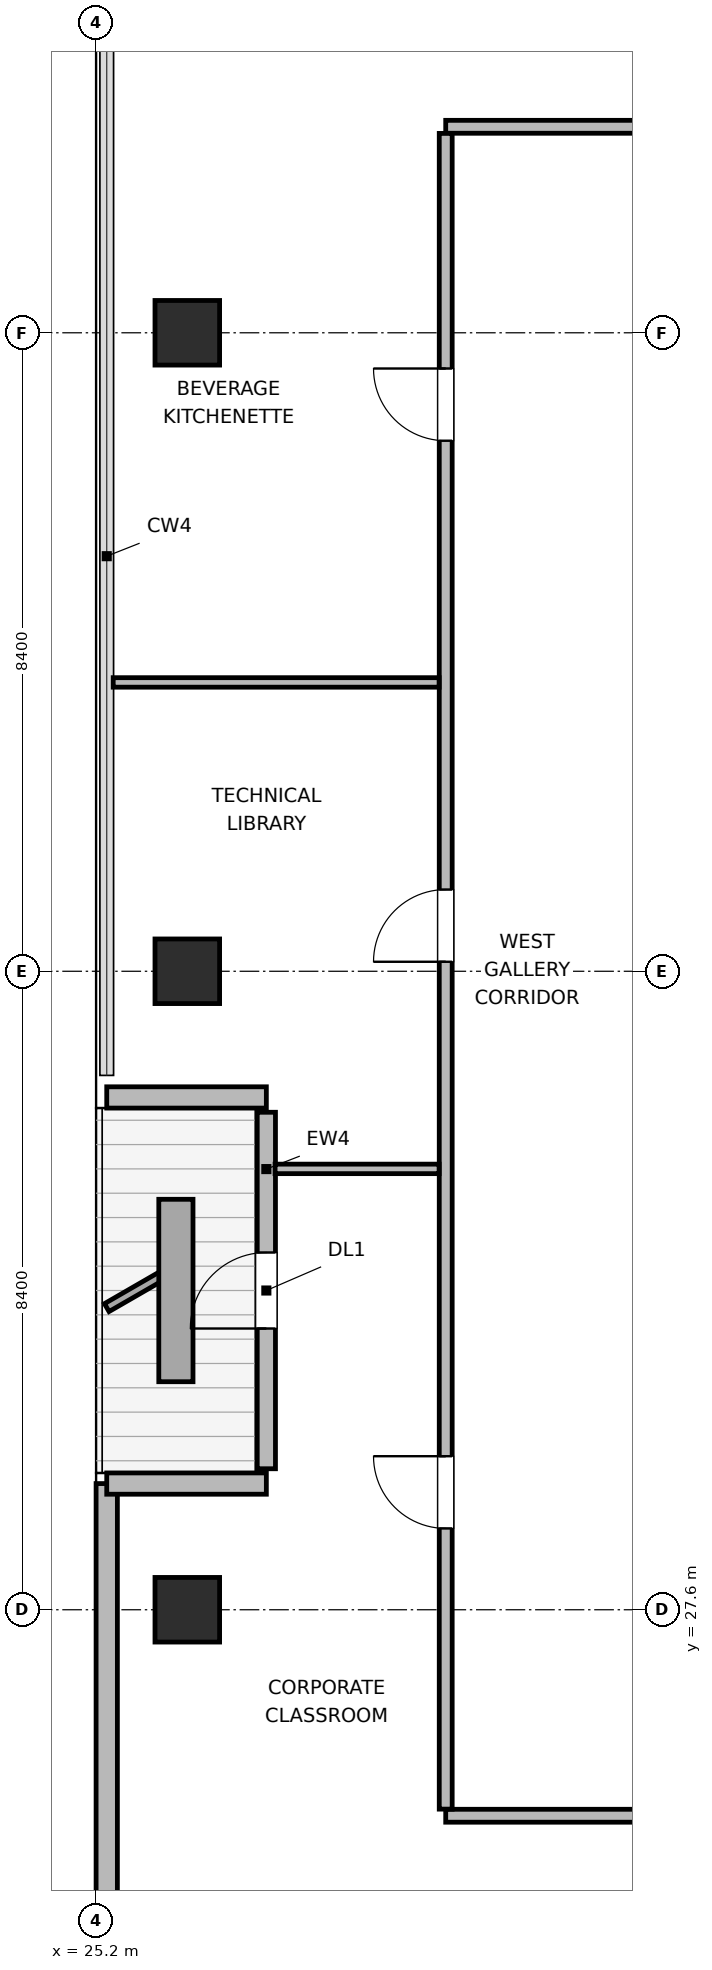
"""IFC4 building model, lengths in metres.
Left out: names, types, materials, properties, quantities, classifications, styles, units other than length and angle.
Written with IfcOpenShell. Run it as: python <this file> out.ifc"""

import sys

from ifc_helpers import new_model, si_unit, direction, frame, frame_2d, origin, origin_2d, place, context, subcontext, project, spatial, rectangle, extrude, element, fill, save


model = new_model("IFC4")
c1 = context("Model", 3, precision=1e-05, world=origin(), true_north=direction((0.0, 1.0)))
c2 = subcontext(c1, "Body", "Model", "MODEL_VIEW")
j1 = project(units=[si_unit("LENGTHUNIT", "METRE"), si_unit("PLANEANGLEUNIT", "RADIAN")], contexts=[c1])
p1 = place(None, origin())
s1 = spatial("IfcSite", under=j1, at=p1, CompositionType="ELEMENT")
p2 = place(p1, origin())
s2 = spatial("IfcBuilding", under=s1, at=p2, CompositionType="ELEMENT")
p3 = place(p2, frame((0.0, 0.0, 342.0)))
s3 = spatial("IfcBuildingStorey", under=s2, at=p3, CompositionType="ELEMENT", Elevation=342.0)
for number, where, z_axis, x_axis in (
    (1, (26.4, 27.6, 0.0), (0.0, 0.0, 1.0), (1.0, 0.0, 0.0)),
    (2, (26.4, 36.0, 0.0), (0.0, 0.0, 1.0), (1.0, 0.0, 0.0)),
    (3, (26.4, 44.4, 0.0), (0.0, 0.0, 1.0), (1.0, 0.0, 0.0)),
):
    element("IfcColumn", number, at=place(p3, frame(where, z_axis=z_axis, x_axis=x_axis)), inside=s3, PredefinedType="COLUMN", context=c2, shape_type="SweptSolid", body=[
        extrude(rectangle(XDim=0.85, YDim=0.85, at=origin_2d()), origin(), (0.0, 0.0, 1.0), 4.5),
    ])
p4 = place(p3, frame((25.34, 23.418, 0.0), z_axis=(0.0, 0.0, 1.0), x_axis=(0.0, 1.0, 0.0)))
e4 = element("IfcWall", 4, at=p4, inside=s3, PredefinedType="SOLIDWALL", context=c2, shape_type="SweptSolid", body=[
    extrude(rectangle(XDim=5.842, YDim=0.28, at=frame_2d((2.921, 0.0))), origin(), (0.0, 0.0, 1.0), 4.28),
])
p5 = place(p3, frame((25.34, 29.26, 0.0), z_axis=(0.0, 0.0, 1.0), x_axis=(1.0, 0.0, 0.0)))
e5 = element("IfcWall", 5, at=p5, inside=s3, PredefinedType="SOLIDWALL", context=c2, shape_type="SweptSolid", body=[
    extrude(rectangle(XDim=2.1, YDim=0.28, at=frame_2d((1.05, 0.0))), origin(), (0.0, 0.0, 1.0), 3.726),
])
p6 = place(p3, frame((27.44, 29.455, 0.0), z_axis=(0.0, 0.0, 1.0), x_axis=(0.0, 1.0, 0.0)))
e6 = element("IfcWall", 6, at=p6, inside=s3, PredefinedType="SOLIDWALL", context=c2, shape_type="SweptSolid", body=[
    extrude(rectangle(XDim=4.69, YDim=0.24, at=frame_2d((2.345, 0.0))), origin(), (0.0, 0.0, 1.0), 3.911),
])
p7 = place(p6, frame((1.845, 0.0, 0.0)))
e7 = element("IfcOpeningElement", 7, at=p7, cuts=e6, PredefinedType="OPENING", context=c2, shape_type="SweptSolid", body=[
    extrude(rectangle(XDim=1.0, YDim=2.02, at=frame_2d((0.5, 1.01))), frame((0.0, 0.13, 0.0), z_axis=(0.0, -1.0, 0.0), x_axis=(1.0, 0.0, 0.0)), (0.0, 0.0, 1.0), 0.26),
])
p8 = place(p3, frame((27.44, 34.34, 0.0), z_axis=(0.0, 0.0, 1.0), x_axis=(-1.0, 0.0, 0.0)))
e8 = element("IfcWall", 8, at=p8, inside=s3, PredefinedType="SOLIDWALL", context=c2, shape_type="SweptSolid", body=[
    extrude(rectangle(XDim=2.1, YDim=0.28, at=frame_2d((1.05, 0.0))), origin(), (0.0, 0.0, 1.0), 3.726),
])
p9 = place(p3, frame((29.8, 24.89, 0.0), z_axis=(0.0, 0.0, 1.0), x_axis=(1.0, 0.0, 0.0)))
e9 = element("IfcWall", 9, at=p9, inside=s3, PredefinedType="PARTITIONING", context=c2, shape_type="SweptSolid", body=[
    extrude(rectangle(XDim=33.8, YDim=0.17, at=frame_2d((16.9, 0.0))), origin(), (0.0, 0.0, 1.0), 4.28),
])
p10 = place(p9, frame((7.975, 0.0, 0.0)))
e10 = element("IfcOpeningElement", 10, at=p10, cuts=e9, PredefinedType="OPENING", context=c2, shape_type="SweptSolid", body=[
    extrude(rectangle(XDim=0.95, YDim=2.04, at=frame_2d((0.475, 1.02))), frame((0.0, 0.095, 0.0), z_axis=(0.0, -1.0, 0.0), x_axis=(1.0, 0.0, 0.0)), (0.0, 0.0, 1.0), 0.19),
])
p11 = place(p9, frame((24.875, 0.0, 0.0)))
e11 = element("IfcOpeningElement", 11, at=p11, cuts=e9, PredefinedType="OPENING", context=c2, shape_type="SweptSolid", body=[
    extrude(rectangle(XDim=0.95, YDim=2.04, at=frame_2d((0.475, 1.02))), frame((0.0, 0.095, 0.0), z_axis=(0.0, -1.0, 0.0), x_axis=(1.0, 0.0, 0.0)), (0.0, 0.0, 1.0), 0.19),
])
p12 = place(p3, frame((29.8, 47.11, 0.0), z_axis=(0.0, 0.0, 1.0), x_axis=(1.0, 0.0, 0.0)))
e12 = element("IfcWall", 12, at=p12, inside=s3, PredefinedType="PARTITIONING", context=c2, shape_type="SweptSolid", body=[
    extrude(rectangle(XDim=33.8, YDim=0.17, at=frame_2d((16.9, 0.0))), origin(), (0.0, 0.0, 1.0), 4.28),
])
p13 = place(p12, frame((5.89, 0.0, 0.0)))
e13 = element("IfcOpeningElement", 13, at=p13, cuts=e12, PredefinedType="OPENING", context=c2, shape_type="SweptSolid", body=[
    extrude(rectangle(XDim=0.95, YDim=2.04, at=frame_2d((0.475, 1.02))), frame((0.0, 0.095, 0.0), z_axis=(0.0, -1.0, 0.0), x_axis=(1.0, 0.0, 0.0)), (0.0, 0.0, 1.0), 0.19),
])
p14 = place(p12, frame((19.31, 0.0, 0.0)))
e14 = element("IfcOpeningElement", 14, at=p14, cuts=e12, PredefinedType="OPENING", context=c2, shape_type="SweptSolid", body=[
    extrude(rectangle(XDim=0.95, YDim=2.04, at=frame_2d((0.475, 1.02))), frame((0.0, 0.095, 0.0), z_axis=(0.0, -1.0, 0.0), x_axis=(1.0, 0.0, 0.0)), (0.0, 0.0, 1.0), 0.19),
])
p15 = place(p12, frame((29.845, 0.0, 0.0)))
e15 = element("IfcOpeningElement", 15, at=p15, cuts=e12, PredefinedType="OPENING", context=c2, shape_type="SweptSolid", body=[
    extrude(rectangle(XDim=0.95, YDim=2.04, at=frame_2d((0.475, 1.02))), frame((0.0, 0.095, 0.0), z_axis=(0.0, -1.0, 0.0), x_axis=(1.0, 0.0, 0.0)), (0.0, 0.0, 1.0), 0.19),
])
p16 = place(p3, frame((29.8, 24.977, 0.0), z_axis=(0.0, 0.0, 1.0), x_axis=(0.0, 1.0, 0.0)))
e16 = element("IfcWall", 16, at=p16, inside=s3, PredefinedType="PARTITIONING", context=c2, shape_type="SweptSolid", body=[
    extrude(rectangle(XDim=22.046, YDim=0.17, at=frame_2d((11.023, 0.0))), origin(), (0.0, 0.0, 1.0), 4.28),
])
p17 = place(p16, frame((3.693, 0.0, 0.0)))
e17 = element("IfcOpeningElement", 17, at=p17, cuts=e16, PredefinedType="OPENING", context=c2, shape_type="SweptSolid", body=[
    extrude(rectangle(XDim=0.95, YDim=2.04, at=frame_2d((0.475, 1.02))), frame((0.0, 0.095, 0.0), z_axis=(0.0, -1.0, 0.0), x_axis=(1.0, 0.0, 0.0)), (0.0, 0.0, 1.0), 0.19),
])
p18 = place(p16, frame((11.148, 0.0, 0.0)))
e18 = element("IfcOpeningElement", 18, at=p18, cuts=e16, PredefinedType="OPENING", context=c2, shape_type="SweptSolid", body=[
    extrude(rectangle(XDim=0.95, YDim=2.04, at=frame_2d((0.475, 1.02))), frame((0.0, 0.095, 0.0), z_axis=(0.0, -1.0, 0.0), x_axis=(1.0, 0.0, 0.0)), (0.0, 0.0, 1.0), 0.19),
])
p19 = place(p16, frame((18.003, 0.0, 0.0)))
e19 = element("IfcOpeningElement", 19, at=p19, cuts=e16, PredefinedType="OPENING", context=c2, shape_type="SweptSolid", body=[
    extrude(rectangle(XDim=0.95, YDim=2.04, at=frame_2d((0.475, 1.02))), frame((0.0, 0.095, 0.0), z_axis=(0.0, -1.0, 0.0), x_axis=(1.0, 0.0, 0.0)), (0.0, 0.0, 1.0), 0.19),
])
p20 = place(p3, frame((27.555, 33.4, 0.0), z_axis=(0.0, 0.0, 1.0), x_axis=(1.0, 0.0, 0.0)))
e20 = element("IfcWall", 20, at=p20, inside=s3, PredefinedType="PARTITIONING", context=c2, shape_type="SweptSolid", body=[
    extrude(rectangle(XDim=2.158, YDim=0.125, at=frame_2d((1.079, 0.0))), origin(), (0.0, 0.0, 1.0), 4.28),
])
p21 = place(p3, frame((25.425, 39.8, 0.0), z_axis=(0.0, 0.0, 1.0), x_axis=(1.0, 0.0, 0.0)))
e21 = element("IfcWall", 21, at=p21, inside=s3, PredefinedType="PARTITIONING", context=c2, shape_type="SweptSolid", body=[
    extrude(rectangle(XDim=4.288, YDim=0.125, at=frame_2d((2.144, 0.0))), origin(), (0.0, 0.0, 1.0), 4.28),
])
p22 = place(p7, origin())
e22 = element("IfcDoor", 22, at=p22, inside=s3, OperationType="SINGLE_SWING_LEFT", PredefinedType="DOOR", context=c2, shape_type="SweptSolid", body=[
    extrude(rectangle(XDim=1.0, YDim=2.02, at=frame_2d((0.5, 1.01))), frame((0.0, 0.025, 0.0), z_axis=(0.0, -1.0, 0.0), x_axis=(1.0, 0.0, 0.0)), (0.0, 0.0, 1.0), 0.05),
])
fill(e7, e22)
p23 = place(p17, origin())
e23 = element("IfcDoor", 23, at=p23, inside=s3, OperationType="SINGLE_SWING_RIGHT", PredefinedType="DOOR", context=c2, shape_type="SweptSolid", body=[
    extrude(rectangle(XDim=0.95, YDim=2.04, at=frame_2d((0.475, 1.02))), frame((0.0, 0.025, 0.0), z_axis=(0.0, -1.0, 0.0), x_axis=(1.0, 0.0, 0.0)), (0.0, 0.0, 1.0), 0.05),
])
fill(e17, e23)
p24 = place(p18, origin())
e24 = element("IfcDoor", 24, at=p24, inside=s3, OperationType="SINGLE_SWING_LEFT", PredefinedType="DOOR", context=c2, shape_type="SweptSolid", body=[
    extrude(rectangle(XDim=0.95, YDim=2.04, at=frame_2d((0.475, 1.02))), frame((0.0, 0.025, 0.0), z_axis=(0.0, -1.0, 0.0), x_axis=(1.0, 0.0, 0.0)), (0.0, 0.0, 1.0), 0.05),
])
fill(e18, e24)
p25 = place(p19, origin())
e25 = element("IfcDoor", 25, at=p25, inside=s3, OperationType="SINGLE_SWING_RIGHT", PredefinedType="DOOR", context=c2, shape_type="SweptSolid", body=[
    extrude(rectangle(XDim=0.95, YDim=2.04, at=frame_2d((0.475, 1.02))), frame((0.0, 0.025, 0.0), z_axis=(0.0, -1.0, 0.0), x_axis=(1.0, 0.0, 0.0)), (0.0, 0.0, 1.0), 0.05),
])
fill(e19, e25)
save(model, sys.argv[1])
